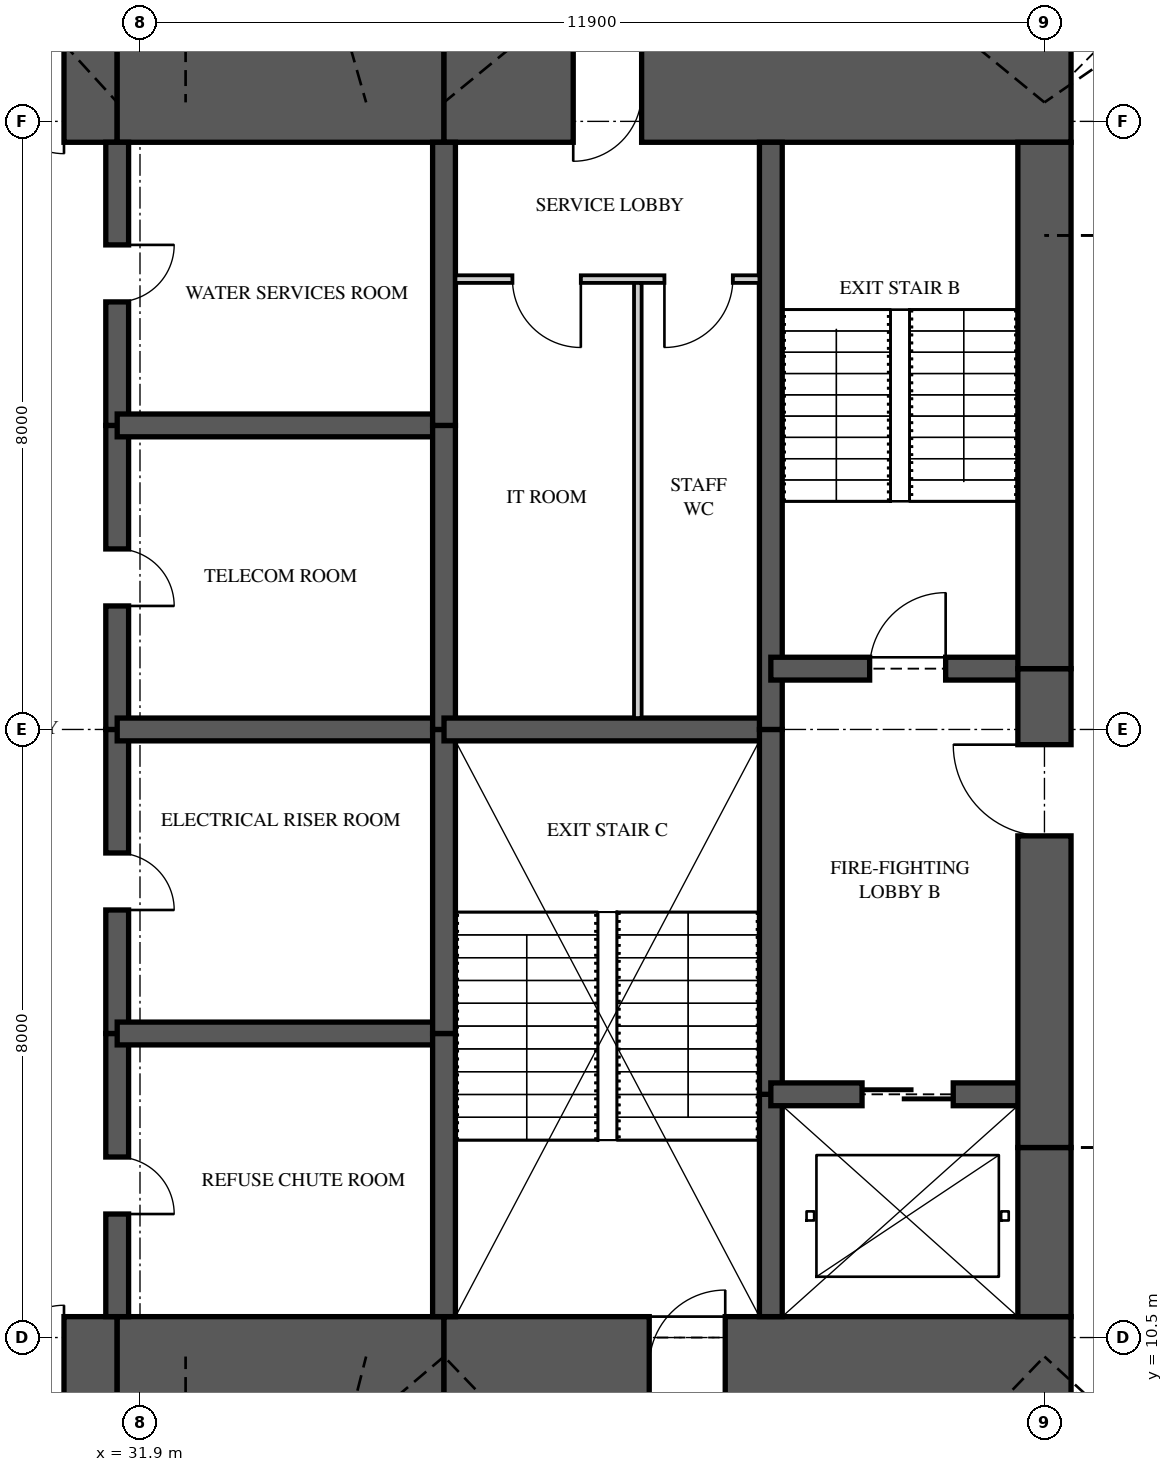
"""IFC4 building model, lengths in metres.
Left out: names, types, materials, properties, quantities, classifications, styles, units other than length and angle.
Written with IfcOpenShell. Run it as: python <this file> out.ifc"""

import sys

from ifc_helpers import new_model, si_unit, direction, frame, frame_2d, origin, place, context, subcontext, project, spatial, rectangle, extrude, element, fill, save


model = new_model("IFC4")
c1 = context("Model", 3, precision=1e-05, world=origin(), true_north=direction((0.0, 1.0)))
c2 = subcontext(c1, "Body", "Model", "MODEL_VIEW")
j1 = project(units=[si_unit("LENGTHUNIT", "METRE"), si_unit("PLANEANGLEUNIT", "RADIAN")], contexts=[c1])
p1 = place(None, origin())
s1 = spatial("IfcSite", under=j1, at=p1, CompositionType="ELEMENT")
p2 = place(p1, origin())
s2 = spatial("IfcBuilding", under=s1, at=p2, CompositionType="ELEMENT")
p3 = place(p2, frame((0.0, 0.0, 207.95)))
s3 = spatial("IfcBuildingStorey", under=s2, at=p3, CompositionType="ELEMENT", Elevation=207.95)
p4 = place(p3, frame((26.0, 10.125, 0.0), z_axis=(0.0, 0.0, 1.0), x_axis=(1.0, 0.0, 0.0)))
e1 = element("IfcWall", 1, at=p4, inside=s3, PredefinedType="SHEAR", context=c2, shape_type="SweptSolid", body=[
    extrude(rectangle(XDim=5.6, YDim=1.3, at=frame_2d((2.8, 0.0))), origin(), (0.0, 0.0, 1.0), 5.0),
])
p5 = place(p4, frame((3.3, 0.0, 0.0)))
e2 = element("IfcOpeningElement", 2, at=p5, cuts=e1, PredefinedType="OPENING", context=c2, shape_type="SweptSolid", body=[
    extrude(rectangle(XDim=1.6, YDim=2.1, at=frame_2d((0.8, 1.05))), frame((0.0, 0.66, 0.0), z_axis=(0.0, -1.0, 0.0), x_axis=(1.0, 0.0, 0.0)), (0.0, 0.0, 1.0), 1.32),
])
p6 = place(p3, frame((31.6, 10.125, 0.0), z_axis=(0.0, 0.0, 1.0), x_axis=(1.0, 0.0, 0.0)))
e3 = element("IfcWall", 3, at=p6, inside=s3, PredefinedType="SHEAR", context=c2, shape_type="SweptSolid", body=[
    extrude(rectangle(XDim=4.3, YDim=1.3, at=frame_2d((2.15, 0.0))), origin(), (0.0, 0.0, 1.0), 5.0),
])
p7 = place(p3, frame((35.9, 10.125, 0.0), z_axis=(0.0, 0.0, 1.0), x_axis=(1.0, 0.0, 0.0)))
e4 = element("IfcWall", 4, at=p7, inside=s3, PredefinedType="SHEAR", context=c2, shape_type="SweptSolid", body=[
    extrude(rectangle(XDim=8.25, YDim=1.3, at=frame_2d((4.125, 0.0))), origin(), (0.0, 0.0, 1.0), 5.0),
])
p8 = place(p7, frame((2.7, 0.0, 0.0)))
e5 = element("IfcOpeningElement", 5, at=p8, cuts=e4, PredefinedType="OPENING", context=c2, shape_type="SweptSolid", body=[
    extrude(rectangle(XDim=1.0, YDim=2.1, at=frame_2d((0.5, 1.05))), frame((0.0, 0.66, 0.0), z_axis=(0.0, -1.0, 0.0), x_axis=(1.0, 0.0, 0.0)), (0.0, 0.0, 1.0), 1.32),
])
p9 = place(p3, frame((44.15, 26.875, 0.0), z_axis=(0.0, 0.0, 1.0), x_axis=(-1.0, 0.0, 0.0)))
e6 = element("IfcWall", 6, at=p9, inside=s3, PredefinedType="SHEAR", context=c2, shape_type="SweptSolid", body=[
    extrude(rectangle(XDim=8.25, YDim=1.3, at=frame_2d((4.125, 0.0))), origin(), (0.0, 0.0, 1.0), 5.0),
])
p10 = place(p9, frame((5.65, 0.0, 0.0)))
e7 = element("IfcOpeningElement", 7, at=p10, cuts=e6, PredefinedType="OPENING", context=c2, shape_type="SweptSolid", body=[
    extrude(rectangle(XDim=0.9, YDim=2.1, at=frame_2d((0.45, 1.05))), frame((0.0, 0.66, 0.0), z_axis=(0.0, -1.0, 0.0), x_axis=(1.0, 0.0, 0.0)), (0.0, 0.0, 1.0), 1.32),
])
p11 = place(p3, frame((35.9, 26.875, 0.0), z_axis=(0.0, 0.0, 1.0), x_axis=(-1.0, 0.0, 0.0)))
e8 = element("IfcWall", 8, at=p11, inside=s3, PredefinedType="SHEAR", context=c2, shape_type="SweptSolid", body=[
    extrude(rectangle(XDim=4.3, YDim=1.3, at=frame_2d((2.15, 0.0))), origin(), (0.0, 0.0, 1.0), 5.0),
])
p12 = place(p3, frame((31.6, 26.875, 0.0), z_axis=(0.0, 0.0, 1.0), x_axis=(-1.0, 0.0, 0.0)))
e9 = element("IfcWall", 9, at=p12, inside=s3, PredefinedType="SHEAR", context=c2, shape_type="SweptSolid", body=[
    extrude(rectangle(XDim=5.6, YDim=1.3, at=frame_2d((2.8, 0.0))), origin(), (0.0, 0.0, 1.0), 5.0),
])
p13 = place(p12, frame((0.7, 0.0, 0.0)))
e10 = element("IfcOpeningElement", 10, at=p13, cuts=e9, PredefinedType="OPENING", context=c2, shape_type="SweptSolid", body=[
    extrude(rectangle(XDim=1.6, YDim=2.1, at=frame_2d((0.8, 1.05))), frame((0.0, 0.66, 0.0), z_axis=(0.0, -1.0, 0.0), x_axis=(1.0, 0.0, 0.0)), (0.0, 0.0, 1.0), 1.32),
])
p14 = place(p3, frame((43.8, 10.775, 0.0), z_axis=(0.0, 0.0, 1.0), x_axis=(0.0, 1.0, 0.0)))
e11 = element("IfcWall", 11, at=p14, inside=s3, PredefinedType="SHEAR", context=c2, shape_type="SweptSolid", body=[
    extrude(rectangle(XDim=2.225, YDim=0.7, at=frame_2d((1.113, 0.0))), origin(), (0.0, 0.0, 1.0), 5.0),
])
p15 = place(p3, frame((43.8, 13.0, 0.0), z_axis=(0.0, 0.0, 1.0), x_axis=(0.0, 1.0, 0.0)))
e12 = element("IfcWall", 12, at=p15, inside=s3, PredefinedType="SHEAR", context=c2, shape_type="SweptSolid", body=[
    extrude(rectangle(XDim=6.3, YDim=0.7, at=frame_2d((3.15, 0.0))), origin(), (0.0, 0.0, 1.0), 5.0),
])
p16 = place(p15, frame((4.1, 0.0, 0.0)))
e13 = element("IfcOpeningElement", 13, at=p16, cuts=e12, PredefinedType="OPENING", context=c2, shape_type="SweptSolid", body=[
    extrude(rectangle(XDim=1.2, YDim=2.2, at=frame_2d((0.6, 1.1))), frame((0.0, 0.36, 0.0), z_axis=(0.0, -1.0, 0.0), x_axis=(1.0, 0.0, 0.0)), (0.0, 0.0, 1.0), 0.72),
])
p17 = place(p3, frame((43.8, 19.3, 0.0), z_axis=(0.0, 0.0, 1.0), x_axis=(0.0, 1.0, 0.0)))
e14 = element("IfcWall", 14, at=p17, inside=s3, PredefinedType="SHEAR", context=c2, shape_type="SweptSolid", body=[
    extrude(rectangle(XDim=6.925, YDim=0.7, at=frame_2d((3.462, 0.0))), origin(), (0.0, 0.0, 1.0), 5.0),
])
p18 = place(p3, frame((31.6, 10.775, 0.0), z_axis=(0.0, 0.0, 1.0), x_axis=(0.0, 1.0, 0.0)))
e15 = element("IfcWall", 15, at=p18, inside=s3, PredefinedType="SHEAR", context=c2, shape_type="SweptSolid", body=[
    extrude(rectangle(XDim=3.725, YDim=0.3, at=frame_2d((1.863, 0.0))), origin(), (0.0, 0.0, 1.0), 5.0),
])
p19 = place(p18, frame((1.35, 0.0, 0.0)))
e16 = element("IfcOpeningElement", 16, at=p19, cuts=e15, PredefinedType="OPENING", context=c2, shape_type="SweptSolid", body=[
    extrude(rectangle(XDim=0.75, YDim=2.1, at=frame_2d((0.375, 1.05))), frame((0.0, 0.16, 0.0), z_axis=(0.0, -1.0, 0.0), x_axis=(1.0, 0.0, 0.0)), (0.0, 0.0, 1.0), 0.32),
])
p20 = place(p3, frame((31.6, 14.5, 0.0), z_axis=(0.0, 0.0, 1.0), x_axis=(0.0, 1.0, 0.0)))
e17 = element("IfcWall", 17, at=p20, inside=s3, PredefinedType="SHEAR", context=c2, shape_type="SweptSolid", body=[
    extrude(rectangle(XDim=4.0, YDim=0.3, at=frame_2d((2.0, 0.0))), origin(), (0.0, 0.0, 1.0), 5.0),
])
p21 = place(p20, frame((1.625, 0.0, 0.0)))
e18 = element("IfcOpeningElement", 18, at=p21, cuts=e17, PredefinedType="OPENING", context=c2, shape_type="SweptSolid", body=[
    extrude(rectangle(XDim=0.75, YDim=2.1, at=frame_2d((0.375, 1.05))), frame((0.0, 0.16, 0.0), z_axis=(0.0, -1.0, 0.0), x_axis=(1.0, 0.0, 0.0)), (0.0, 0.0, 1.0), 0.32),
])
p22 = place(p3, frame((31.6, 18.5, 0.0), z_axis=(0.0, 0.0, 1.0), x_axis=(0.0, 1.0, 0.0)))
e19 = element("IfcWall", 19, at=p22, inside=s3, PredefinedType="SHEAR", context=c2, shape_type="SweptSolid", body=[
    extrude(rectangle(XDim=4.0, YDim=0.3, at=frame_2d((2.0, 0.0))), origin(), (0.0, 0.0, 1.0), 5.0),
])
p23 = place(p22, frame((1.625, 0.0, 0.0)))
e20 = element("IfcOpeningElement", 20, at=p23, cuts=e19, PredefinedType="OPENING", context=c2, shape_type="SweptSolid", body=[
    extrude(rectangle(XDim=0.75, YDim=2.1, at=frame_2d((0.375, 1.05))), frame((0.0, 0.16, 0.0), z_axis=(0.0, -1.0, 0.0), x_axis=(1.0, 0.0, 0.0)), (0.0, 0.0, 1.0), 0.32),
])
p24 = place(p3, frame((31.6, 22.5, 0.0), z_axis=(0.0, 0.0, 1.0), x_axis=(0.0, 1.0, 0.0)))
e21 = element("IfcWall", 21, at=p24, inside=s3, PredefinedType="SHEAR", context=c2, shape_type="SweptSolid", body=[
    extrude(rectangle(XDim=3.725, YDim=0.3, at=frame_2d((1.863, 0.0))), origin(), (0.0, 0.0, 1.0), 5.0),
])
p25 = place(p24, frame((1.625, 0.0, 0.0)))
e22 = element("IfcOpeningElement", 22, at=p25, cuts=e21, PredefinedType="OPENING", context=c2, shape_type="SweptSolid", body=[
    extrude(rectangle(XDim=0.75, YDim=2.1, at=frame_2d((0.375, 1.05))), frame((0.0, 0.16, 0.0), z_axis=(0.0, -1.0, 0.0), x_axis=(1.0, 0.0, 0.0)), (0.0, 0.0, 1.0), 0.32),
])
p26 = place(p3, frame((35.9, 10.775, 0.0), z_axis=(0.0, 0.0, 1.0), x_axis=(0.0, 1.0, 0.0)))
e23 = element("IfcWall", 23, at=p26, inside=s3, PredefinedType="SHEAR", context=c2, shape_type="SweptSolid", body=[
    extrude(rectangle(XDim=3.725, YDim=0.3, at=frame_2d((1.863, 0.0))), origin(), (0.0, 0.0, 1.0), 5.0),
])
for number, where, z_axis, x_axis in (
    (24, (35.9, 14.5, 0.0), (0.0, 0.0, 1.0), (0.0, 1.0, 0.0)),
    (25, (35.9, 18.5, 0.0), (0.0, 0.0, 1.0), (0.0, 1.0, 0.0)),
):
    element("IfcWall", number, at=place(p3, frame(where, z_axis=z_axis, x_axis=x_axis)), inside=s3, PredefinedType="SHEAR", context=c2, shape_type="SweptSolid", body=[
        extrude(rectangle(XDim=4.0, YDim=0.3, at=frame_2d((2.0, 0.0))), origin(), (0.0, 0.0, 1.0), 5.0),
    ])
p27 = place(p3, frame((35.9, 22.5, 0.0), z_axis=(0.0, 0.0, 1.0), x_axis=(0.0, 1.0, 0.0)))
e26 = element("IfcWall", 26, at=p27, inside=s3, PredefinedType="SHEAR", context=c2, shape_type="SweptSolid", body=[
    extrude(rectangle(XDim=3.725, YDim=0.3, at=frame_2d((1.863, 0.0))), origin(), (0.0, 0.0, 1.0), 5.0),
])
p28 = place(p3, frame((40.2, 10.775, 0.0), z_axis=(0.0, 0.0, 1.0), x_axis=(0.0, 1.0, 0.0)))
e27 = element("IfcWall", 27, at=p28, inside=s3, PredefinedType="SHEAR", context=c2, shape_type="SweptSolid", body=[
    extrude(rectangle(XDim=2.925, YDim=0.3, at=frame_2d((1.462, 0.0))), origin(), (0.0, 0.0, 1.0), 5.0),
])
p29 = place(p3, frame((40.2, 13.7, 0.0), z_axis=(0.0, 0.0, 1.0), x_axis=(0.0, 1.0, 0.0)))
e28 = element("IfcWall", 28, at=p29, inside=s3, PredefinedType="SHEAR", context=c2, shape_type="SweptSolid", body=[
    extrude(rectangle(XDim=4.8, YDim=0.3, at=frame_2d((2.4, 0.0))), origin(), (0.0, 0.0, 1.0), 5.0),
])
p30 = place(p3, frame((40.2, 18.5, 0.0), z_axis=(0.0, 0.0, 1.0), x_axis=(0.0, 1.0, 0.0)))
e29 = element("IfcWall", 29, at=p30, inside=s3, PredefinedType="SHEAR", context=c2, shape_type="SweptSolid", body=[
    extrude(rectangle(XDim=7.725, YDim=0.3, at=frame_2d((3.863, 0.0))), origin(), (0.0, 0.0, 1.0), 5.0),
])
for number, where, z_axis, x_axis in (
    (30, (31.6, 14.5, 0.0), (0.0, 0.0, 1.0), (1.0, 0.0, 0.0)),
    (31, (31.6, 18.5, 0.0), (0.0, 0.0, 1.0), (1.0, 0.0, 0.0)),
    (32, (31.6, 22.5, 0.0), (0.0, 0.0, 1.0), (1.0, 0.0, 0.0)),
):
    element("IfcWall", number, at=place(p3, frame(where, z_axis=z_axis, x_axis=x_axis)), inside=s3, PredefinedType="SHEAR", context=c2, shape_type="SweptSolid", body=[
        extrude(rectangle(XDim=4.3, YDim=0.3, at=frame_2d((2.15, 0.0))), origin(), (0.0, 0.0, 1.0), 5.0),
    ])
p31 = place(p3, frame((35.9, 18.5, 0.0), z_axis=(0.0, 0.0, 1.0), x_axis=(1.0, 0.0, 0.0)))
e33 = element("IfcWall", 33, at=p31, inside=s3, PredefinedType="SHEAR", context=c2, shape_type="SweptSolid", body=[
    extrude(rectangle(XDim=4.3, YDim=0.3, at=frame_2d((2.15, 0.0))), origin(), (0.0, 0.0, 1.0), 5.0),
])
p32 = place(p3, frame((40.2, 13.7, 0.0), z_axis=(0.0, 0.0, 1.0), x_axis=(1.0, 0.0, 0.0)))
e34 = element("IfcWall", 34, at=p32, inside=s3, PredefinedType="SHEAR", context=c2, shape_type="SweptSolid", body=[
    extrude(rectangle(XDim=3.6, YDim=0.3, at=frame_2d((1.8, 0.0))), origin(), (0.0, 0.0, 1.0), 5.0),
])
p33 = place(p32, frame((1.2, 0.0, 0.0)))
e35 = element("IfcOpeningElement", 35, at=p33, cuts=e34, PredefinedType="OPENING", context=c2, shape_type="SweptSolid", body=[
    extrude(rectangle(XDim=1.2, YDim=2.1, at=frame_2d((0.6, 1.05))), frame((0.0, 0.16, 0.0), z_axis=(0.0, -1.0, 0.0), x_axis=(1.0, 0.0, 0.0)), (0.0, 0.0, 1.0), 0.32),
])
p34 = place(p3, frame((40.2, 19.3, 0.0), z_axis=(0.0, 0.0, 1.0), x_axis=(1.0, 0.0, 0.0)))
e36 = element("IfcWall", 36, at=p34, inside=s3, PredefinedType="SHEAR", context=c2, shape_type="SweptSolid", body=[
    extrude(rectangle(XDim=3.6, YDim=0.3, at=frame_2d((1.8, 0.0))), origin(), (0.0, 0.0, 1.0), 5.0),
])
p35 = place(p34, frame((1.3, 0.0, 0.0)))
e37 = element("IfcOpeningElement", 37, at=p35, cuts=e36, PredefinedType="OPENING", context=c2, shape_type="SweptSolid", body=[
    extrude(rectangle(XDim=1.0, YDim=2.1, at=frame_2d((0.5, 1.05))), frame((0.0, 0.16, 0.0), z_axis=(0.0, -1.0, 0.0), x_axis=(1.0, 0.0, 0.0)), (0.0, 0.0, 1.0), 0.32),
])
p36 = place(p3, frame((36.05, 24.425, 0.0), z_axis=(0.0, 0.0, 1.0), x_axis=(1.0, 0.0, 0.0)))
e38 = element("IfcWall", 38, at=p36, inside=s3, PredefinedType="PARTITIONING", context=c2, shape_type="SweptSolid", body=[
    extrude(rectangle(XDim=4.0, YDim=0.1, at=frame_2d((2.0, 0.0))), origin(), (0.0, 0.0, 1.0), 4.72),
])
p37 = place(p36, frame((0.75, 0.0, 0.0)))
e39 = element("IfcOpeningElement", 39, at=p37, cuts=e38, PredefinedType="OPENING", context=c2, shape_type="SweptSolid", body=[
    extrude(rectangle(XDim=0.9, YDim=2.1, at=frame_2d((0.45, 1.05))), frame((0.0, 0.06, 0.0), z_axis=(0.0, -1.0, 0.0), x_axis=(1.0, 0.0, 0.0)), (0.0, 0.0, 1.0), 0.12),
])
p38 = place(p36, frame((2.75, 0.0, 0.0)))
e40 = element("IfcOpeningElement", 40, at=p38, cuts=e38, PredefinedType="OPENING", context=c2, shape_type="SweptSolid", body=[
    extrude(rectangle(XDim=0.9, YDim=2.1, at=frame_2d((0.45, 1.05))), frame((0.0, 0.06, 0.0), z_axis=(0.0, -1.0, 0.0), x_axis=(1.0, 0.0, 0.0)), (0.0, 0.0, 1.0), 0.12),
])
p39 = place(p3, frame((38.45, 18.65, 0.0), z_axis=(0.0, 0.0, 1.0), x_axis=(0.0, 1.0, 0.0)))
e41 = element("IfcWall", 41, at=p39, inside=s3, PredefinedType="PARTITIONING", context=c2, shape_type="SweptSolid", body=[
    extrude(rectangle(XDim=5.725, YDim=0.1, at=frame_2d((2.863, 0.0))), origin(), (0.0, 0.0, 1.0), 4.72),
])
p40 = place(p37, frame((0.9, 0.0, 0.0), z_axis=(0.0, 0.0, 1.0), x_axis=(-1.0, 0.0, 0.0)))
e42 = element("IfcDoor", 42, at=p40, inside=s3, OperationType="SINGLE_SWING_LEFT", PredefinedType="DOOR", context=c2, shape_type="SweptSolid", body=[
    extrude(rectangle(XDim=0.9, YDim=2.1, at=frame_2d((0.45, 1.05))), frame((0.0, 0.025, 0.0), z_axis=(0.0, -1.0, 0.0), x_axis=(1.0, 0.0, 0.0)), (0.0, 0.0, 1.0), 0.05),
])
fill(e39, e42)
p41 = place(p38, frame((0.9, 0.0, 0.0), z_axis=(0.0, 0.0, 1.0), x_axis=(-1.0, 0.0, 0.0)))
e43 = element("IfcDoor", 43, at=p41, inside=s3, OperationType="SINGLE_SWING_RIGHT", PredefinedType="DOOR", context=c2, shape_type="SweptSolid", body=[
    extrude(rectangle(XDim=0.9, YDim=2.1, at=frame_2d((0.45, 1.05))), frame((0.0, 0.025, 0.0), z_axis=(0.0, -1.0, 0.0), x_axis=(1.0, 0.0, 0.0)), (0.0, 0.0, 1.0), 0.05),
])
fill(e40, e43)
p42 = place(p35, origin())
e44 = element("IfcDoor", 44, at=p42, inside=s3, OperationType="SINGLE_SWING_RIGHT", PredefinedType="DOOR", context=c2, shape_type="SweptSolid", body=[
    extrude(rectangle(XDim=1.0, YDim=2.1, at=frame_2d((0.5, 1.05))), frame((0.0, 0.025, 0.0), z_axis=(0.0, -1.0, 0.0), x_axis=(1.0, 0.0, 0.0)), (0.0, 0.0, 1.0), 0.05),
])
fill(e37, e44)
p43 = place(p16, origin())
e45 = element("IfcDoor", 45, at=p43, inside=s3, OperationType="SINGLE_SWING_RIGHT", PredefinedType="DOOR", context=c2, shape_type="SweptSolid", body=[
    extrude(rectangle(XDim=1.2, YDim=2.2, at=frame_2d((0.6, 1.1))), frame((0.0, 0.025, 0.0), z_axis=(0.0, -1.0, 0.0), x_axis=(1.0, 0.0, 0.0)), (0.0, 0.0, 1.0), 0.05),
])
fill(e13, e45)
p44 = place(p33, origin())
e46 = element("IfcDoor", 46, at=p44, inside=s3, OperationType="SLIDING_TO_LEFT", PredefinedType="DOOR", context=c2, shape_type="SweptSolid", body=[
    extrude(rectangle(XDim=1.2, YDim=2.1, at=frame_2d((0.6, 1.05))), frame((0.0, 0.025, 0.0), z_axis=(0.0, -1.0, 0.0), x_axis=(1.0, 0.0, 0.0)), (0.0, 0.0, 1.0), 0.05),
])
fill(e35, e46)
p45 = place(p5, origin())
e47 = element("IfcDoor", 47, at=p45, inside=s3, OperationType="DOUBLE_DOOR_SINGLE_SWING", PredefinedType="DOOR", context=c2, shape_type="SweptSolid", body=[
    extrude(rectangle(XDim=1.6, YDim=2.1, at=frame_2d((0.8, 1.05))), frame((0.0, 0.025, 0.0), z_axis=(0.0, -1.0, 0.0), x_axis=(1.0, 0.0, 0.0)), (0.0, 0.0, 1.0), 0.05),
])
fill(e2, e47)
p46 = place(p13, origin())
e48 = element("IfcDoor", 48, at=p46, inside=s3, OperationType="DOUBLE_DOOR_SINGLE_SWING", PredefinedType="DOOR", context=c2, shape_type="SweptSolid", body=[
    extrude(rectangle(XDim=1.6, YDim=2.1, at=frame_2d((0.8, 1.05))), frame((0.0, 0.025, 0.0), z_axis=(0.0, -1.0, 0.0), x_axis=(1.0, 0.0, 0.0)), (0.0, 0.0, 1.0), 0.05),
])
fill(e10, e48)
p47 = place(p19, frame((0.75, 0.0, 0.0), z_axis=(0.0, 0.0, 1.0), x_axis=(-1.0, 0.0, 0.0)))
e49 = element("IfcDoor", 49, at=p47, inside=s3, OperationType="SINGLE_SWING_RIGHT", PredefinedType="DOOR", context=c2, shape_type="SweptSolid", body=[
    extrude(rectangle(XDim=0.75, YDim=2.1, at=frame_2d((0.375, 1.05))), frame((0.0, 0.025, 0.0), z_axis=(0.0, -1.0, 0.0), x_axis=(1.0, 0.0, 0.0)), (0.0, 0.0, 1.0), 0.05),
])
fill(e16, e49)
p48 = place(p21, frame((0.75, 0.0, 0.0), z_axis=(0.0, 0.0, 1.0), x_axis=(-1.0, 0.0, 0.0)))
e50 = element("IfcDoor", 50, at=p48, inside=s3, OperationType="SINGLE_SWING_RIGHT", PredefinedType="DOOR", context=c2, shape_type="SweptSolid", body=[
    extrude(rectangle(XDim=0.75, YDim=2.1, at=frame_2d((0.375, 1.05))), frame((0.0, 0.025, 0.0), z_axis=(0.0, -1.0, 0.0), x_axis=(1.0, 0.0, 0.0)), (0.0, 0.0, 1.0), 0.05),
])
fill(e18, e50)
p49 = place(p23, frame((0.75, 0.0, 0.0), z_axis=(0.0, 0.0, 1.0), x_axis=(-1.0, 0.0, 0.0)))
e51 = element("IfcDoor", 51, at=p49, inside=s3, OperationType="SINGLE_SWING_RIGHT", PredefinedType="DOOR", context=c2, shape_type="SweptSolid", body=[
    extrude(rectangle(XDim=0.75, YDim=2.1, at=frame_2d((0.375, 1.05))), frame((0.0, 0.025, 0.0), z_axis=(0.0, -1.0, 0.0), x_axis=(1.0, 0.0, 0.0)), (0.0, 0.0, 1.0), 0.05),
])
fill(e20, e51)
p50 = place(p25, frame((0.75, 0.0, 0.0), z_axis=(0.0, 0.0, 1.0), x_axis=(-1.0, 0.0, 0.0)))
e52 = element("IfcDoor", 52, at=p50, inside=s3, OperationType="SINGLE_SWING_LEFT", PredefinedType="DOOR", context=c2, shape_type="SweptSolid", body=[
    extrude(rectangle(XDim=0.75, YDim=2.1, at=frame_2d((0.375, 1.05))), frame((0.0, 0.025, 0.0), z_axis=(0.0, -1.0, 0.0), x_axis=(1.0, 0.0, 0.0)), (0.0, 0.0, 1.0), 0.05),
])
fill(e22, e52)
p51 = place(p8, origin())
e53 = element("IfcDoor", 53, at=p51, inside=s3, OperationType="SINGLE_SWING_RIGHT", PredefinedType="DOOR", context=c2, shape_type="SweptSolid", body=[
    extrude(rectangle(XDim=1.0, YDim=2.1, at=frame_2d((0.5, 1.05))), frame((0.0, 0.025, 0.0), z_axis=(0.0, -1.0, 0.0), x_axis=(1.0, 0.0, 0.0)), (0.0, 0.0, 1.0), 0.05),
])
fill(e5, e53)
p52 = place(p10, origin())
e54 = element("IfcDoor", 54, at=p52, inside=s3, OperationType="SINGLE_SWING_RIGHT", PredefinedType="DOOR", context=c2, shape_type="SweptSolid", body=[
    extrude(rectangle(XDim=0.9, YDim=2.1, at=frame_2d((0.45, 1.05))), frame((0.0, 0.47, 0.0), z_axis=(0.0, -1.0, 0.0), x_axis=(1.0, 0.0, 0.0)), (0.0, 0.0, 1.0), 0.8),
])
fill(e7, e54)
save(model, sys.argv[1])
